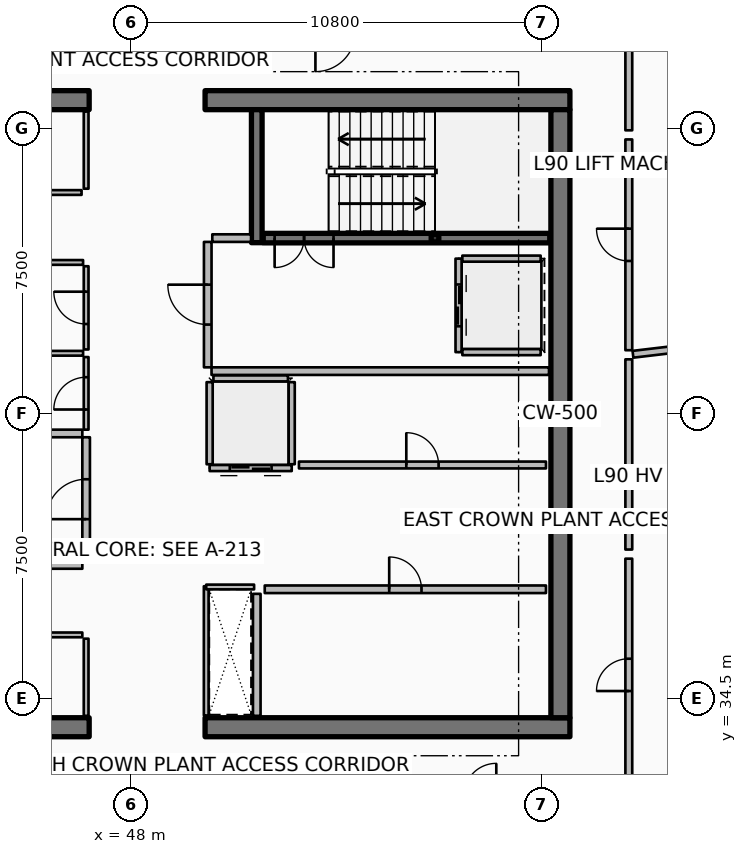
"""IFC4 building model, lengths in metres.
Left out: names, types, materials, properties, quantities, classifications, styles, units other than length and angle.
Written with IfcOpenShell. Run it as: python <this file> out.ifc"""

import sys

from ifc_helpers import new_model, si_unit, direction, frame, frame_2d, origin, origin_2d, place, context, subcontext, project, spatial, rectangle, hollow_rectangle, extrude, element, fill, save


model = new_model("IFC4")
c1 = context("Model", 3, precision=1e-05, world=origin(), true_north=direction((0.0, 1.0)))
c2 = subcontext(c1, "Body", "Model", "MODEL_VIEW")
j1 = project(units=[si_unit("LENGTHUNIT", "METRE"), si_unit("PLANEANGLEUNIT", "RADIAN")], contexts=[c1])
p1 = place(None, origin())
s1 = spatial("IfcSite", under=j1, at=p1, CompositionType="ELEMENT")
p2 = place(p1, origin())
s2 = spatial("IfcBuilding", under=s1, at=p2, CompositionType="ELEMENT")
p3 = place(p2, frame((0.0, 0.0, 359.6)))
s3 = spatial("IfcBuildingStorey", under=s2, at=p3, CompositionType="ELEMENT", Elevation=359.6)
p4 = place(p3, frame((37.3, 33.75, 0.0), z_axis=(0.0, 0.0, 1.0), x_axis=(1.0, 0.0, 0.0)))
e1 = element("IfcWall", 1, at=p4, inside=s3, PredefinedType="SHEAR", context=c2, shape_type="SweptSolid", body=[
    extrude(rectangle(XDim=9.6, YDim=0.5, at=frame_2d((4.8, 0.0))), origin(), (0.0, 0.0, 1.0), 3.6),
])
p5 = place(p3, frame((49.95, 33.75, 0.0), z_axis=(0.0, 0.0, 1.0), x_axis=(1.0, 0.0, 0.0)))
e2 = element("IfcWall", 2, at=p5, inside=s3, PredefinedType="SHEAR", context=c2, shape_type="SweptSolid", body=[
    extrude(rectangle(XDim=9.6, YDim=0.5, at=frame_2d((4.8, 0.0))), origin(), (0.0, 0.0, 1.0), 3.6),
])
p6 = place(p3, frame((37.3, 50.25, 0.0), z_axis=(0.0, 0.0, 1.0), x_axis=(1.0, 0.0, 0.0)))
e3 = element("IfcWall", 3, at=p6, inside=s3, PredefinedType="SHEAR", context=c2, shape_type="SweptSolid", body=[
    extrude(rectangle(XDim=9.6, YDim=0.5, at=frame_2d((4.8, 0.0))), origin(), (0.0, 0.0, 1.0), 3.6),
])
p7 = place(p3, frame((49.95, 50.25, 0.0), z_axis=(0.0, 0.0, 1.0), x_axis=(1.0, 0.0, 0.0)))
e4 = element("IfcWall", 4, at=p7, inside=s3, PredefinedType="SHEAR", context=c2, shape_type="SweptSolid", body=[
    extrude(rectangle(XDim=9.6, YDim=0.5, at=frame_2d((4.8, 0.0))), origin(), (0.0, 0.0, 1.0), 3.6),
])
p8 = place(p3, frame((59.3, 34.0, 0.0), z_axis=(0.0, 0.0, 1.0), x_axis=(0.0, 1.0, 0.0)))
e5 = element("IfcWall", 5, at=p8, inside=s3, PredefinedType="SHEAR", context=c2, shape_type="SweptSolid", body=[
    extrude(rectangle(XDim=16.0, YDim=0.5, at=frame_2d((8.0, 0.0))), origin(), (0.0, 0.0, 1.0), 3.6),
])
p9 = place(p3, frame((51.31, 46.5, 0.0), z_axis=(0.0, 0.0, 1.0), x_axis=(0.0, 1.0, 0.0)))
e6 = element("IfcWall", 6, at=p9, inside=s3, PredefinedType="SHEAR", context=c2, shape_type="SweptSolid", body=[
    extrude(rectangle(XDim=3.5, YDim=0.28, at=frame_2d((1.75, 0.0))), origin(), (0.0, 0.0, 1.0), 3.6),
])
p10 = place(p3, frame((56.0, 46.62, 0.0), z_axis=(0.0, 0.0, 1.0), x_axis=(1.0, 0.0, 0.0)))
e7 = element("IfcColumn", 7, at=p10, inside=s3, PredefinedType="COLUMN", context=c2, shape_type="SweptSolid", body=[
    extrude(hollow_rectangle(XDim=0.2, YDim=0.2, WallThickness=0.01, InnerFilletRadius=0.01, OuterFilletRadius=0.02, at=origin_2d()), origin(), (0.0, 0.0, 1.0), 1.595),
])
p11 = place(p3, frame((51.48, 46.62, 0.0), z_axis=(0.0, 0.0, 1.0), x_axis=(1.0, 0.0, 0.0)))
e8 = element("IfcWall", 8, at=p11, inside=s3, PredefinedType="SOLIDWALL", context=c2, shape_type="SweptSolid", body=[
    extrude(rectangle(XDim=7.54, YDim=0.25, at=frame_2d((3.77, 0.0))), origin(), (0.0, 0.0, 1.0), 3.32),
])
p12 = place(p11, frame((0.3, 0.0, 0.0)))
e9 = element("IfcOpeningElement", 9, at=p12, cuts=e8, PredefinedType="OPENING", context=c2, shape_type="SweptSolid", body=[
    extrude(rectangle(XDim=1.55, YDim=2.15, at=frame_2d((0.775, 1.075))), frame((0.0, 0.135, 0.0), z_axis=(0.0, -1.0, 0.0), x_axis=(1.0, 0.0, 0.0)), (0.0, 0.0, 1.0), 0.27),
])
p13 = place(p3, frame((51.52, 37.38, 0.0), z_axis=(0.0, 0.0, 1.0), x_axis=(1.0, 0.0, 0.0)))
e10 = element("IfcWall", 10, at=p13, inside=s3, PredefinedType="PARTITIONING", context=c2, shape_type="SweptSolid", body=[
    extrude(rectangle(XDim=7.4, YDim=0.2, at=frame_2d((3.7, 0.0))), origin(), (0.0, 0.0, 1.0), 3.32),
])
p14 = place(p13, frame((3.275, 0.0, 0.0)))
e11 = element("IfcOpeningElement", 11, at=p14, cuts=e10, PredefinedType="OPENING", context=c2, shape_type="SweptSolid", body=[
    extrude(rectangle(XDim=0.85, YDim=2.06, at=frame_2d((0.425, 1.03))), frame((0.0, 0.11, 0.0), z_axis=(0.0, -1.0, 0.0), x_axis=(1.0, 0.0, 0.0)), (0.0, 0.0, 1.0), 0.22),
])
p15 = place(p3, frame((51.31, 34.05, 0.0), z_axis=(0.0, 0.0, 1.0), x_axis=(0.0, 1.0, 0.0)))
e12 = element("IfcWall", 12, at=p15, inside=s3, PredefinedType="PARTITIONING", context=c2, shape_type="SweptSolid", body=[
    extrude(rectangle(XDim=3.21, YDim=0.2, at=frame_2d((1.605, 0.0))), origin(), (0.0, 0.0, 1.0), 3.32),
])
p16 = place(p3, frame((56.62, 46.08, 0.0), z_axis=(0.0, 0.0, 1.0), x_axis=(0.0, -1.0, 0.0)))
e13 = element("IfcWall", 13, at=p16, inside=s3, PredefinedType="PARTITIONING", context=c2, shape_type="SweptSolid", body=[
    extrude(rectangle(XDim=2.46, YDim=0.16, at=frame_2d((1.23, 0.0))), origin(), (0.0, 0.0, 1.0), 3.32),
])
p17 = place(p16, frame((0.68, 0.0, 0.0)))
e14 = element("IfcOpeningElement", 14, at=p17, cuts=e13, PredefinedType="OPENING", context=c2, shape_type="SweptSolid", body=[
    extrude(rectangle(XDim=1.1, YDim=2.1, at=frame_2d((0.55, 1.05))), frame((0.0, 0.09, 0.0), z_axis=(0.0, -1.0, 0.0), x_axis=(1.0, 0.0, 0.0)), (0.0, 0.0, 1.0), 0.18),
])
for number, where, z_axis, x_axis in (
    (15, (56.72, 46.08, 0.0), (0.0, 0.0, 1.0), (1.0, 0.0, 0.0)),
    (16, (56.72, 43.62, 0.0), (0.0, 0.0, 1.0), (1.0, 0.0, 0.0)),
):
    element("IfcWall", number, at=place(p3, frame(where, z_axis=z_axis, x_axis=x_axis)), inside=s3, PredefinedType="PARTITIONING", context=c2, shape_type="SweptSolid", body=[
        extrude(rectangle(XDim=2.06, YDim=0.16, at=frame_2d((1.03, 0.0))), origin(), (0.0, 0.0, 1.0), 3.32),
    ])
p18 = place(p3, frame((52.23, 40.57, 0.0), z_axis=(0.0, 0.0, 1.0), x_axis=(-1.0, 0.0, 0.0)))
e17 = element("IfcWall", 17, at=p18, inside=s3, PredefinedType="PARTITIONING", context=c2, shape_type="SweptSolid", body=[
    extrude(rectangle(XDim=2.16, YDim=0.16, at=frame_2d((1.08, 0.0))), origin(), (0.0, 0.0, 1.0), 3.32),
])
p19 = place(p18, frame((0.53, 0.0, 0.0)))
e18 = element("IfcOpeningElement", 18, at=p19, cuts=e17, PredefinedType="OPENING", context=c2, shape_type="SweptSolid", body=[
    extrude(rectangle(XDim=1.1, YDim=2.1, at=frame_2d((0.55, 1.05))), frame((0.0, 0.09, 0.0), z_axis=(0.0, -1.0, 0.0), x_axis=(1.0, 0.0, 0.0)), (0.0, 0.0, 1.0), 0.18),
])
for number, where, z_axis, x_axis in (
    (19, (52.23, 40.67, 0.0), (0.0, 0.0, 1.0), (0.0, 1.0, 0.0)),
    (20, (50.07, 40.67, 0.0), (0.0, 0.0, 1.0), (0.0, 1.0, 0.0)),
):
    element("IfcWall", number, at=place(p3, frame(where, z_axis=z_axis, x_axis=x_axis)), inside=s3, PredefinedType="PARTITIONING", context=c2, shape_type="SweptSolid", body=[
        extrude(rectangle(XDim=2.16, YDim=0.16, at=frame_2d((1.08, 0.0))), origin(), (0.0, 0.0, 1.0), 3.32),
    ])
p20 = place(p3, frame((50.17, 42.93, 0.0), z_axis=(0.0, 0.0, 1.0), x_axis=(1.0, 0.0, 0.0)))
e21 = element("IfcWall", 21, at=p20, inside=s3, PredefinedType="PARTITIONING", context=c2, shape_type="SweptSolid", body=[
    extrude(rectangle(XDim=1.96, YDim=0.16, at=frame_2d((0.98, 0.0))), origin(), (0.0, 0.0, 1.0), 3.32),
])
p21 = place(p3, frame((52.42, 40.65, 0.0), z_axis=(0.0, 0.0, 1.0), x_axis=(1.0, 0.0, 0.0)))
e22 = element("IfcWall", 22, at=p21, inside=s3, PredefinedType="PARTITIONING", context=c2, shape_type="SweptSolid", body=[
    extrude(rectangle(XDim=6.5, YDim=0.18, at=frame_2d((3.25, 0.0))), origin(), (0.0, 0.0, 1.0), 3.32),
])
p22 = place(p21, frame((2.825, 0.0, 0.0)))
e23 = element("IfcOpeningElement", 23, at=p22, cuts=e22, PredefinedType="OPENING", context=c2, shape_type="SweptSolid", body=[
    extrude(rectangle(XDim=0.85, YDim=2.06, at=frame_2d((0.425, 1.03))), frame((0.0, 0.1, 0.0), z_axis=(0.0, -1.0, 0.0), x_axis=(1.0, 0.0, 0.0)), (0.0, 0.0, 1.0), 0.2),
])
p23 = place(p3, frame((46.82, 34.05, 0.0), z_axis=(0.0, 0.0, 1.0), x_axis=(0.0, 1.0, 0.0)))
e24 = element("IfcWall", 24, at=p23, inside=s3, PredefinedType="PARTITIONING", context=c2, shape_type="SweptSolid", body=[
    extrude(rectangle(XDim=2.03, YDim=0.125, at=frame_2d((1.015, 0.0))), origin(), (0.0, 0.0, 1.0), 2.76),
])
p24 = place(p3, frame((37.92, 36.18, 0.0), z_axis=(0.0, 0.0, 1.0), x_axis=(1.0, 0.0, 0.0)))
e25 = element("IfcWall", 25, at=p24, inside=s3, PredefinedType="PARTITIONING", context=c2, shape_type="SweptSolid", body=[
    extrude(rectangle(XDim=8.8, YDim=0.125, at=frame_2d((4.4, 0.0))), origin(), (0.0, 0.0, 1.0), 2.76),
])
p25 = place(p24, frame((3.975, 0.0, 0.0)))
e26 = element("IfcOpeningElement", 26, at=p25, cuts=e25, PredefinedType="OPENING", context=c2, shape_type="SweptSolid", body=[
    extrude(rectangle(XDim=0.85, YDim=2.06, at=frame_2d((0.425, 1.03))), frame((0.0, 0.073, 0.0), z_axis=(0.0, -1.0, 0.0), x_axis=(1.0, 0.0, 0.0)), (0.0, 0.0, 1.0), 0.145),
])
p26 = place(p3, frame((46.82, 47.92, 0.0), z_axis=(0.0, 0.0, 1.0), x_axis=(0.0, 1.0, 0.0)))
e27 = element("IfcWall", 27, at=p26, inside=s3, PredefinedType="PARTITIONING", context=c2, shape_type="SweptSolid", body=[
    extrude(rectangle(XDim=2.03, YDim=0.125, at=frame_2d((1.015, 0.0))), origin(), (0.0, 0.0, 1.0), 2.76),
])
p27 = place(p3, frame((42.2, 47.82, 0.0), z_axis=(0.0, 0.0, 1.0), x_axis=(1.0, 0.0, 0.0)))
e28 = element("IfcWall", 28, at=p27, inside=s3, PredefinedType="PARTITIONING", context=c2, shape_type="SweptSolid", body=[
    extrude(rectangle(XDim=4.5, YDim=0.125, at=frame_2d((2.25, 0.0))), origin(), (0.0, 0.0, 1.0), 2.76),
])
p28 = place(p27, frame((1.825, 0.0, 0.0)))
e29 = element("IfcOpeningElement", 29, at=p28, cuts=e28, PredefinedType="OPENING", context=c2, shape_type="SweptSolid", body=[
    extrude(rectangle(XDim=0.85, YDim=2.06, at=frame_2d((0.425, 1.03))), frame((0.0, 0.073, 0.0), z_axis=(0.0, -1.0, 0.0), x_axis=(1.0, 0.0, 0.0)), (0.0, 0.0, 1.0), 0.145),
])
p29 = place(p3, frame((41.35, 38.02, 0.0), z_axis=(0.0, 0.0, 1.0), x_axis=(1.0, 0.0, 0.0)))
e30 = element("IfcWall", 30, at=p29, inside=s3, PredefinedType="PARTITIONING", context=c2, shape_type="SweptSolid", body=[
    extrude(rectangle(XDim=5.37, YDim=0.2, at=frame_2d((2.685, 0.0))), origin(), (0.0, 0.0, 1.0), 3.32),
])
p30 = place(p3, frame((43.92, 41.48, 0.0), z_axis=(0.0, 0.0, 1.0), x_axis=(1.0, 0.0, 0.0)))
e31 = element("IfcWall", 31, at=p30, inside=s3, PredefinedType="PARTITIONING", context=c2, shape_type="SweptSolid", body=[
    extrude(rectangle(XDim=2.8, YDim=0.2, at=frame_2d((1.4, 0.0))), origin(), (0.0, 0.0, 1.0), 3.32),
])
p31 = place(p3, frame((46.82, 38.12, 0.0), z_axis=(0.0, 0.0, 1.0), x_axis=(0.0, 1.0, 0.0)))
e32 = element("IfcWall", 32, at=p31, inside=s3, PredefinedType="PARTITIONING", context=c2, shape_type="SweptSolid", body=[
    extrude(rectangle(XDim=3.26, YDim=0.2, at=frame_2d((1.63, 0.0))), origin(), (0.0, 0.0, 1.0), 3.32),
])
p32 = place(p31, frame((1.105, 0.0, 0.0)))
e33 = element("IfcOpeningElement", 33, at=p32, cuts=e32, PredefinedType="OPENING", context=c2, shape_type="SweptSolid", body=[
    extrude(rectangle(XDim=1.05, YDim=2.1, at=frame_2d((0.525, 1.05))), frame((0.0, 0.11, 0.0), z_axis=(0.0, -1.0, 0.0), x_axis=(1.0, 0.0, 0.0)), (0.0, 0.0, 1.0), 0.22),
])
p33 = place(p3, frame((50.12, 43.12, 0.0), z_axis=(0.0, 0.0, 1.0), x_axis=(1.0, 0.0, 0.0)))
e34 = element("IfcWall", 34, at=p33, inside=s3, PredefinedType="PARTITIONING", context=c2, shape_type="SweptSolid", body=[
    extrude(rectangle(XDim=8.88, YDim=0.2, at=frame_2d((4.44, 0.0))), origin(), (0.0, 0.0, 1.0), 3.32),
])
p34 = place(p3, frame((50.14, 46.62, 0.0), z_axis=(0.0, 0.0, 1.0), x_axis=(1.0, 0.0, 0.0)))
e35 = element("IfcWall", 35, at=p34, inside=s3, PredefinedType="PARTITIONING", context=c2, shape_type="SweptSolid", body=[
    extrude(rectangle(XDim=1.02, YDim=0.2, at=frame_2d((0.51, 0.0))), origin(), (0.0, 0.0, 1.0), 3.32),
])
p35 = place(p3, frame((50.02, 43.22, 0.0), z_axis=(0.0, 0.0, 1.0), x_axis=(0.0, 1.0, 0.0)))
e36 = element("IfcWall", 36, at=p35, inside=s3, PredefinedType="PARTITIONING", context=c2, shape_type="SweptSolid", body=[
    extrude(rectangle(XDim=3.3, YDim=0.2, at=frame_2d((1.65, 0.0))), origin(), (0.0, 0.0, 1.0), 3.32),
])
p36 = place(p35, frame((1.125, 0.0, 0.0)))
e37 = element("IfcOpeningElement", 37, at=p36, cuts=e36, PredefinedType="OPENING", context=c2, shape_type="SweptSolid", body=[
    extrude(rectangle(XDim=1.05, YDim=2.1, at=frame_2d((0.525, 1.05))), frame((0.0, 0.11, 0.0), z_axis=(0.0, -1.0, 0.0), x_axis=(1.0, 0.0, 0.0)), (0.0, 0.0, 1.0), 0.22),
])
p37 = place(p3, frame((49.98, 34.06, 0.0), z_axis=(0.0, 0.0, 1.0), x_axis=(0.0, 1.0, 0.0)))
e38 = element("IfcWall", 38, at=p37, inside=s3, PredefinedType="PARTITIONING", context=c2, shape_type="SweptSolid", body=[
    extrude(rectangle(XDim=3.4, YDim=0.125, at=frame_2d((1.7, 0.0))), origin(), (0.0, 0.0, 1.0), 2.76),
])
p38 = place(p3, frame((49.98, 37.44, 0.0), z_axis=(0.0, 0.0, 1.0), x_axis=(1.0, 0.0, 0.0)))
e39 = element("IfcWall", 39, at=p38, inside=s3, PredefinedType="PARTITIONING", context=c2, shape_type="SweptSolid", body=[
    extrude(rectangle(XDim=1.26, YDim=0.125, at=frame_2d((0.63, 0.0))), origin(), (0.0, 0.0, 1.0), 2.76),
])
p39 = place(p3, frame((44.03, 43.59, 0.0), z_axis=(0.0, 0.0, 1.0), x_axis=(1.0, 0.0, 0.0)))
e40 = element("IfcWall", 40, at=p39, inside=s3, PredefinedType="PARTITIONING", context=c2, shape_type="SweptSolid", body=[
    extrude(rectangle(XDim=2.71, YDim=0.125, at=frame_2d((1.355, 0.0))), origin(), (0.0, 0.0, 1.0), 2.76),
])
p40 = place(p3, frame((46.82, 41.58, 0.0), z_axis=(0.0, 0.0, 1.0), x_axis=(0.0, 1.0, 0.0)))
e41 = element("IfcWall", 41, at=p40, inside=s3, PredefinedType="PARTITIONING", context=c2, shape_type="SweptSolid", body=[
    extrude(rectangle(XDim=1.91, YDim=0.125, at=frame_2d((0.955, 0.0))), origin(), (0.0, 0.0, 1.0), 2.76),
])
p41 = place(p40, frame((0.53, 0.0, 0.0)))
e42 = element("IfcOpeningElement", 42, at=p41, cuts=e41, PredefinedType="OPENING", context=c2, shape_type="SweptSolid", body=[
    extrude(rectangle(XDim=0.85, YDim=2.06, at=frame_2d((0.425, 1.03))), frame((0.0, 0.073, 0.0), z_axis=(0.0, -1.0, 0.0), x_axis=(1.0, 0.0, 0.0)), (0.0, 0.0, 1.0), 0.145),
])
p42 = place(p3, frame((46.82, 43.69, 0.0), z_axis=(0.0, 0.0, 1.0), x_axis=(0.0, 1.0, 0.0)))
e43 = element("IfcWall", 43, at=p42, inside=s3, PredefinedType="PARTITIONING", context=c2, shape_type="SweptSolid", body=[
    extrude(rectangle(XDim=2.19, YDim=0.125, at=frame_2d((1.095, 0.0))), origin(), (0.0, 0.0, 1.0), 2.76),
])
p43 = place(p42, frame((0.67, 0.0, 0.0)))
e44 = element("IfcOpeningElement", 44, at=p43, cuts=e43, PredefinedType="OPENING", context=c2, shape_type="SweptSolid", body=[
    extrude(rectangle(XDim=0.85, YDim=2.06, at=frame_2d((0.425, 1.03))), frame((0.0, 0.073, 0.0), z_axis=(0.0, -1.0, 0.0), x_axis=(1.0, 0.0, 0.0)), (0.0, 0.0, 1.0), 0.145),
])
p44 = place(p3, frame((45.48, 45.98, 0.0), z_axis=(0.0, 0.0, 1.0), x_axis=(1.0, 0.0, 0.0)))
e45 = element("IfcWall", 45, at=p44, inside=s3, PredefinedType="PARTITIONING", context=c2, shape_type="SweptSolid", body=[
    extrude(rectangle(XDim=1.26, YDim=0.125, at=frame_2d((0.63, 0.0))), origin(), (0.0, 0.0, 1.0), 2.76),
])
p45 = place(p3, frame((61.1, 32.07, 0.0), z_axis=(0.0, 0.0, 1.0), x_axis=(0.0, 1.0, 0.0)))
e46 = element("IfcWall", 46, at=p45, inside=s3, PredefinedType="PARTITIONING", context=c2, shape_type="SweptSolid", body=[
    extrude(rectangle(XDim=6.115, YDim=0.18, at=frame_2d((3.058, 0.0))), origin(), (0.0, 0.0, 1.0), 2.76),
])
p46 = place(p45, frame((2.633, 0.0, 0.0)))
e47 = element("IfcOpeningElement", 47, at=p46, cuts=e46, PredefinedType="OPENING", context=c2, shape_type="SweptSolid", body=[
    extrude(rectangle(XDim=0.85, YDim=2.06, at=frame_2d((0.425, 1.03))), frame((0.0, 0.1, 0.0), z_axis=(0.0, -1.0, 0.0), x_axis=(1.0, 0.0, 0.0)), (0.0, 0.0, 1.0), 0.2),
])
p47 = place(p3, frame((61.1, 38.425, 0.0), z_axis=(0.0, 0.0, 1.0), x_axis=(0.0, 1.0, 0.0)))
e48 = element("IfcWall", 48, at=p47, inside=s3, PredefinedType="PARTITIONING", context=c2, shape_type="SweptSolid", body=[
    extrude(rectangle(XDim=5.005, YDim=0.18, at=frame_2d((2.502, 0.0))), origin(), (0.0, 0.0, 1.0), 2.76),
])
p48 = place(p3, frame((61.209, 43.563, 0.0), z_axis=(0.0, 0.0, 1.0), x_axis=(0.993070558818, 0.117519637545, 0.0)))
e49 = element("IfcWall", 49, at=p48, inside=s3, PredefinedType="PARTITIONING", context=c2, shape_type="SweptSolid", body=[
    extrude(rectangle(XDim=7.83, YDim=0.18, at=frame_2d((3.915, 0.0))), origin(), (0.0, 0.0, 1.0), 2.76),
])
p49 = place(p3, frame((61.1, 43.67, 0.0), z_axis=(0.0, 0.0, 1.0), x_axis=(0.0, 1.0, 0.0)))
e50 = element("IfcWall", 50, at=p49, inside=s3, PredefinedType="PARTITIONING", context=c2, shape_type="SweptSolid", body=[
    extrude(rectangle(XDim=5.546, YDim=0.18, at=frame_2d((2.773, 0.0))), origin(), (0.0, 0.0, 1.0), 2.76),
])
p50 = place(p49, frame((2.348, 0.0, 0.0)))
e51 = element("IfcOpeningElement", 51, at=p50, cuts=e50, PredefinedType="OPENING", context=c2, shape_type="SweptSolid", body=[
    extrude(rectangle(XDim=0.85, YDim=2.06, at=frame_2d((0.425, 1.03))), frame((0.0, 0.1, 0.0), z_axis=(0.0, -1.0, 0.0), x_axis=(1.0, 0.0, 0.0)), (0.0, 0.0, 1.0), 0.2),
])
p51 = place(p3, frame((61.1, 49.456, 0.0), z_axis=(0.0, 0.0, 1.0), x_axis=(0.0, 1.0, 0.0)))
e52 = element("IfcWall", 52, at=p51, inside=s3, PredefinedType="PARTITIONING", context=c2, shape_type="SweptSolid", body=[
    extrude(rectangle(XDim=2.474, YDim=0.18, at=frame_2d((1.237, 0.0))), origin(), (0.0, 0.0, 1.0), 2.76),
])
p52 = place(p12, origin())
e53 = element("IfcDoor", 53, at=p52, inside=s3, OperationType="DOUBLE_DOOR_SINGLE_SWING", PredefinedType="DOOR", context=c2, shape_type="SweptSolid", body=[
    extrude(rectangle(XDim=1.55, YDim=2.15, at=frame_2d((0.775, 1.075))), frame((0.0, 0.025, 0.0), z_axis=(0.0, -1.0, 0.0), x_axis=(1.0, 0.0, 0.0)), (0.0, 0.0, 1.0), 0.05),
])
fill(e9, e53)
p53 = place(p14, origin())
e54 = element("IfcDoor", 54, at=p53, inside=s3, OperationType="SINGLE_SWING_LEFT", PredefinedType="DOOR", context=c2, shape_type="SweptSolid", body=[
    extrude(rectangle(XDim=0.85, YDim=2.06, at=frame_2d((0.425, 1.03))), frame((0.0, 0.025, 0.0), z_axis=(0.0, -1.0, 0.0), x_axis=(1.0, 0.0, 0.0)), (0.0, 0.0, 1.0), 0.05),
])
fill(e11, e54)
p54 = place(p17, origin())
e55 = element("IfcDoor", 55, at=p54, inside=s3, OperationType="DOUBLE_DOOR_SLIDING", PredefinedType="DOOR", context=c2, shape_type="SweptSolid", body=[
    extrude(rectangle(XDim=1.1, YDim=2.1, at=frame_2d((0.55, 1.05))), frame((0.0, 0.025, 0.0), z_axis=(0.0, -1.0, 0.0), x_axis=(1.0, 0.0, 0.0)), (0.0, 0.0, 1.0), 0.05),
])
fill(e14, e55)
p55 = place(p19, origin())
e56 = element("IfcDoor", 56, at=p55, inside=s3, OperationType="DOUBLE_DOOR_SLIDING", PredefinedType="DOOR", context=c2, shape_type="SweptSolid", body=[
    extrude(rectangle(XDim=1.1, YDim=2.1, at=frame_2d((0.55, 1.05))), frame((0.0, 0.025, 0.0), z_axis=(0.0, -1.0, 0.0), x_axis=(1.0, 0.0, 0.0)), (0.0, 0.0, 1.0), 0.05),
])
fill(e18, e56)
p56 = place(p22, origin())
e57 = element("IfcDoor", 57, at=p56, inside=s3, OperationType="SINGLE_SWING_LEFT", PredefinedType="DOOR", context=c2, shape_type="SweptSolid", body=[
    extrude(rectangle(XDim=0.85, YDim=2.06, at=frame_2d((0.425, 1.03))), frame((0.0, 0.025, 0.0), z_axis=(0.0, -1.0, 0.0), x_axis=(1.0, 0.0, 0.0)), (0.0, 0.0, 1.0), 0.05),
])
fill(e23, e57)
p57 = place(p32, origin())
e58 = element("IfcDoor", 58, at=p57, inside=s3, OperationType="SINGLE_SWING_LEFT", PredefinedType="DOOR", context=c2, shape_type="SweptSolid", body=[
    extrude(rectangle(XDim=1.05, YDim=2.1, at=frame_2d((0.525, 1.05))), frame((0.0, 0.025, 0.0), z_axis=(0.0, -1.0, 0.0), x_axis=(1.0, 0.0, 0.0)), (0.0, 0.0, 1.0), 0.05),
])
fill(e33, e58)
p58 = place(p36, origin())
e59 = element("IfcDoor", 59, at=p58, inside=s3, OperationType="SINGLE_SWING_RIGHT", PredefinedType="DOOR", context=c2, shape_type="SweptSolid", body=[
    extrude(rectangle(XDim=1.05, YDim=2.1, at=frame_2d((0.525, 1.05))), frame((0.0, 0.025, 0.0), z_axis=(0.0, -1.0, 0.0), x_axis=(1.0, 0.0, 0.0)), (0.0, 0.0, 1.0), 0.05),
])
fill(e37, e59)
p59 = place(p41, origin())
e60 = element("IfcDoor", 60, at=p59, inside=s3, OperationType="SINGLE_SWING_LEFT", PredefinedType="DOOR", context=c2, shape_type="SweptSolid", body=[
    extrude(rectangle(XDim=0.85, YDim=2.06, at=frame_2d((0.425, 1.03))), frame((0.0, 0.025, 0.0), z_axis=(0.0, -1.0, 0.0), x_axis=(1.0, 0.0, 0.0)), (0.0, 0.0, 1.0), 0.05),
])
fill(e42, e60)
p60 = place(p43, origin())
e61 = element("IfcDoor", 61, at=p60, inside=s3, OperationType="SINGLE_SWING_RIGHT", PredefinedType="DOOR", context=c2, shape_type="SweptSolid", body=[
    extrude(rectangle(XDim=0.85, YDim=2.06, at=frame_2d((0.425, 1.03))), frame((0.0, 0.025, 0.0), z_axis=(0.0, -1.0, 0.0), x_axis=(1.0, 0.0, 0.0)), (0.0, 0.0, 1.0), 0.05),
])
fill(e44, e61)
p61 = place(p46, origin())
e62 = element("IfcDoor", 62, at=p61, inside=s3, OperationType="SINGLE_SWING_LEFT", PredefinedType="DOOR", context=c2, shape_type="SweptSolid", body=[
    extrude(rectangle(XDim=0.85, YDim=2.06, at=frame_2d((0.425, 1.03))), frame((0.0, 0.025, 0.0), z_axis=(0.0, -1.0, 0.0), x_axis=(1.0, 0.0, 0.0)), (0.0, 0.0, 1.0), 0.05),
])
fill(e47, e62)
p62 = place(p50, origin())
e63 = element("IfcDoor", 63, at=p62, inside=s3, OperationType="SINGLE_SWING_RIGHT", PredefinedType="DOOR", context=c2, shape_type="SweptSolid", body=[
    extrude(rectangle(XDim=0.85, YDim=2.06, at=frame_2d((0.425, 1.03))), frame((0.0, 0.025, 0.0), z_axis=(0.0, -1.0, 0.0), x_axis=(1.0, 0.0, 0.0)), (0.0, 0.0, 1.0), 0.05),
])
fill(e51, e63)
save(model, sys.argv[1])
